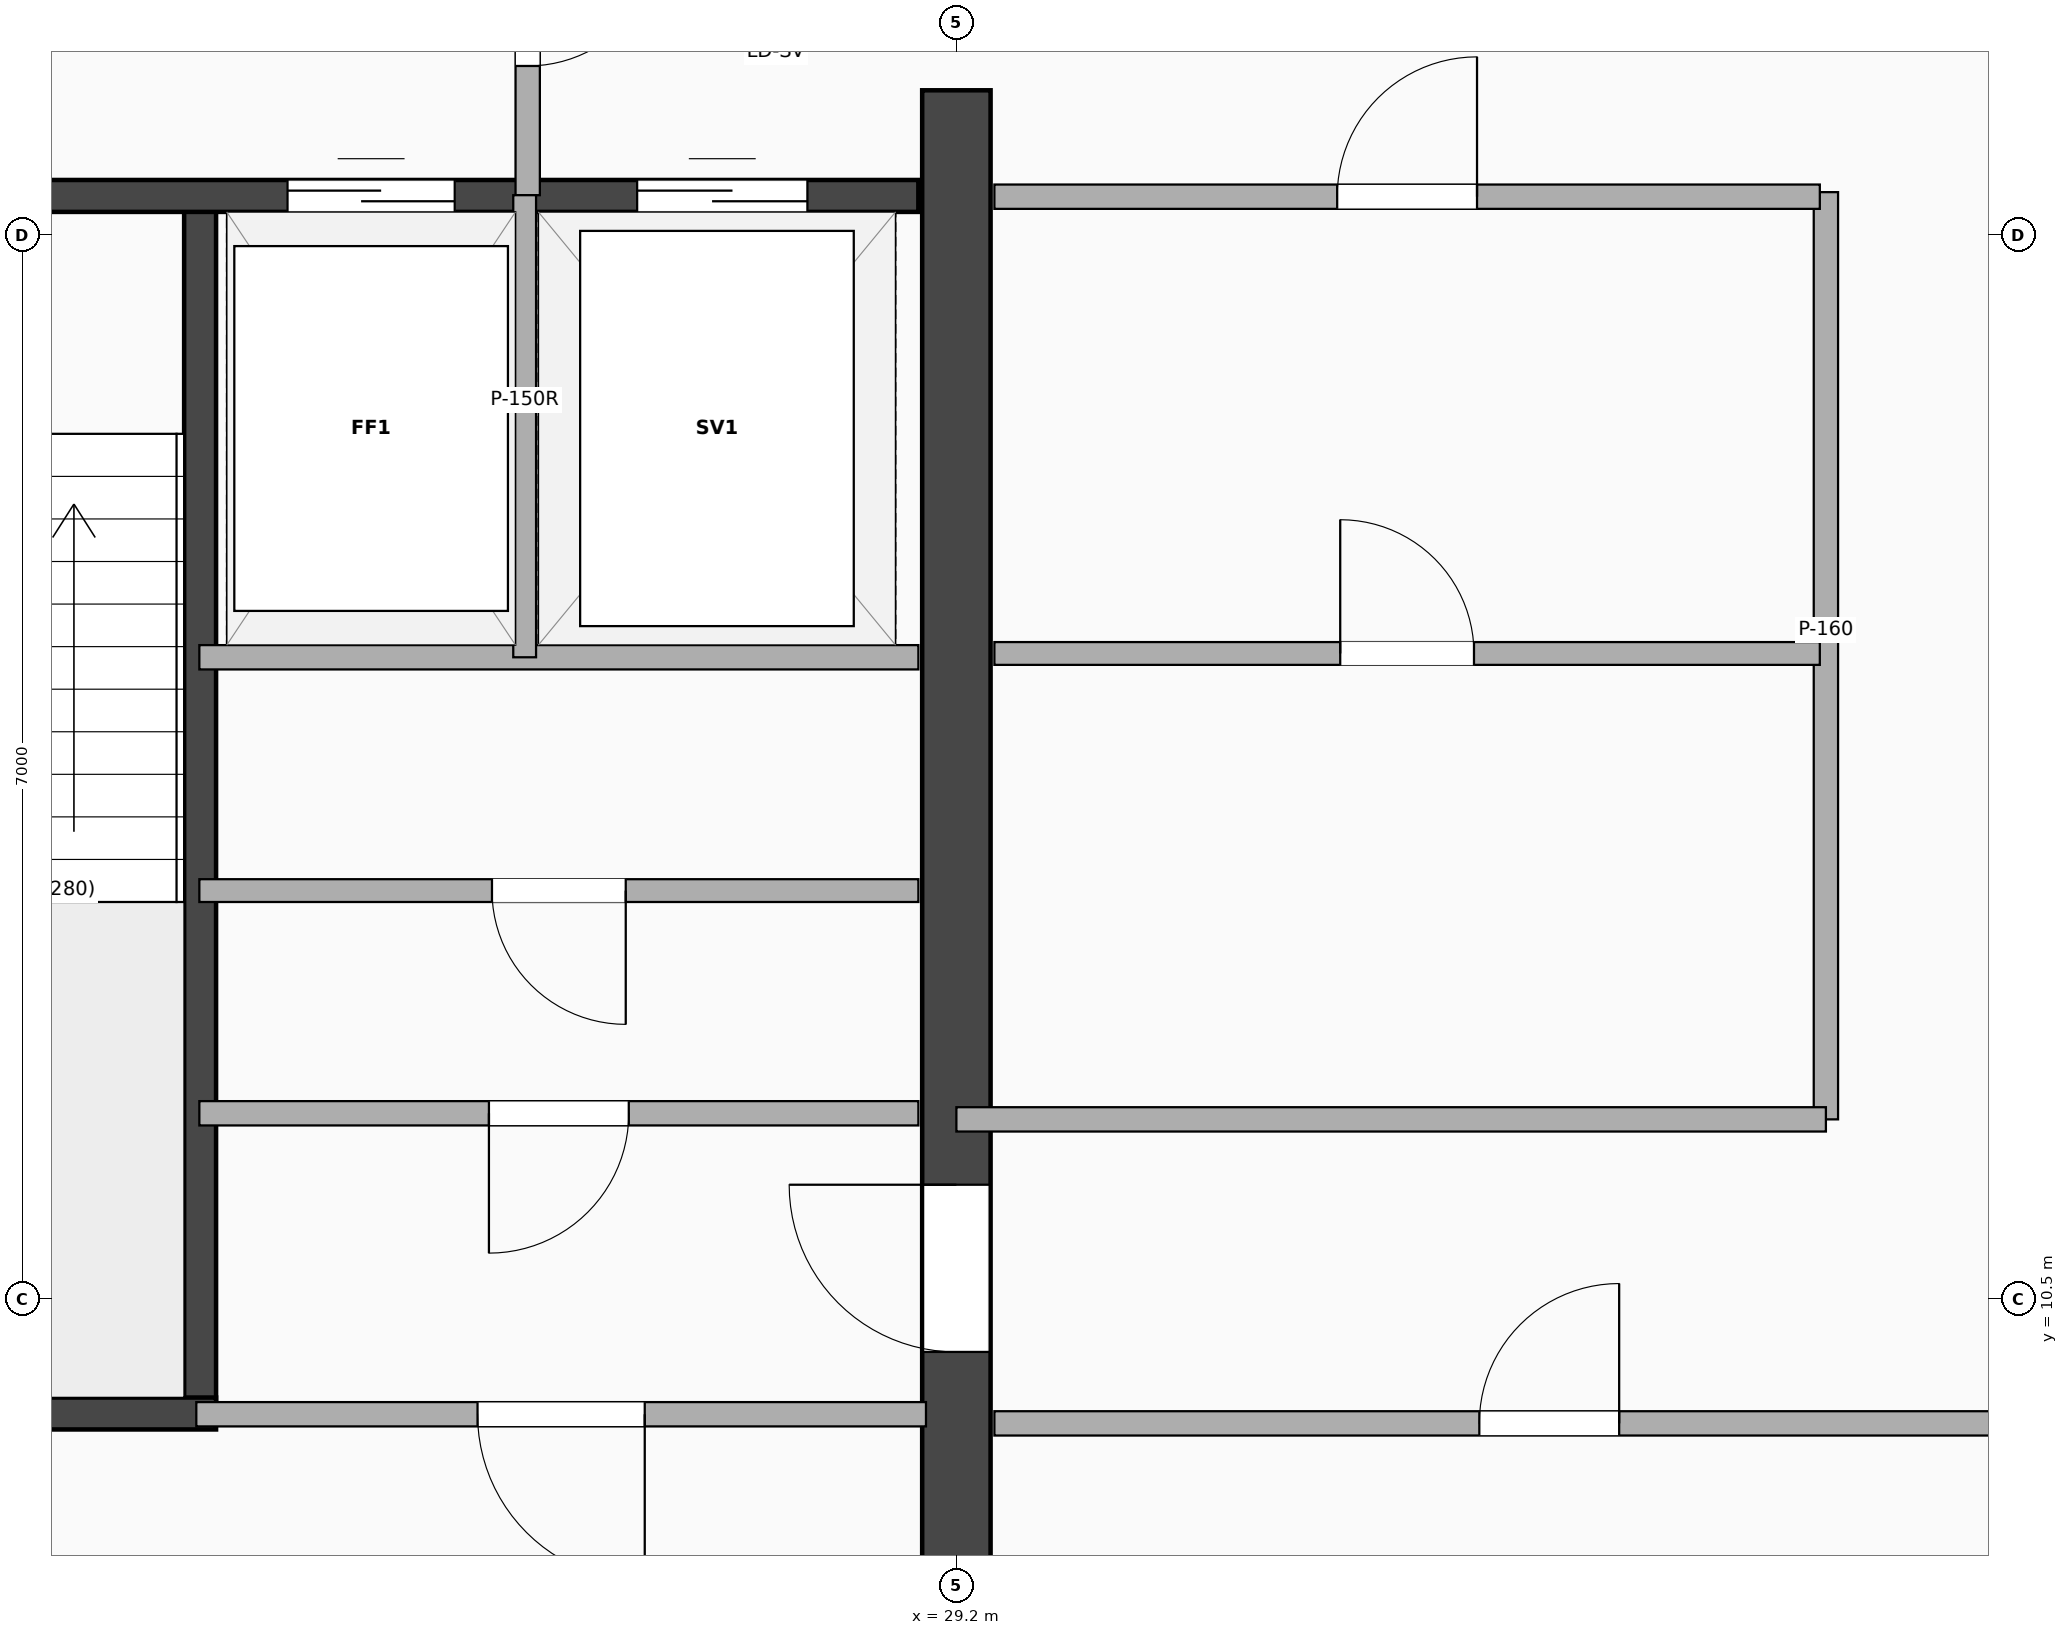
"""IFC4 building model, lengths in metres.
Left out: names, types, materials, properties, quantities, classifications, styles, units other than length and angle.
Written with IfcOpenShell. Run it as: python <this file> out.ifc"""

import sys

from ifc_helpers import new_model, si_unit, direction, frame, frame_2d, origin, place, context, subcontext, project, spatial, rectangle, extrude, element, fill, save


model = new_model("IFC4")
c1 = context("Model", 3, precision=1e-05, world=origin(), true_north=direction((0.0, 1.0)))
c2 = subcontext(c1, "Body", "Model", "MODEL_VIEW")
j1 = project(units=[si_unit("LENGTHUNIT", "METRE"), si_unit("PLANEANGLEUNIT", "RADIAN")], contexts=[c1])
p1 = place(None, origin())
s1 = spatial("IfcSite", under=j1, at=p1, CompositionType="ELEMENT")
p2 = place(p1, origin())
s2 = spatial("IfcBuilding", under=s1, at=p2, CompositionType="ELEMENT")
p3 = place(p2, frame((0.0, 0.0, 192.5)))
s3 = spatial("IfcBuildingStorey", under=s2, at=p3, CompositionType="ELEMENT", Elevation=192.5)
p4 = place(p3, frame((29.2, 3.5, 0.0), z_axis=(0.0, 0.0, 1.0), x_axis=(0.0, 1.0, 0.0)))
e1 = element("IfcWall", 1, at=p4, inside=s3, PredefinedType="SHEAR", context=c2, shape_type="SweptSolid", body=[
    extrude(rectangle(XDim=14.95, YDim=0.45, at=frame_2d((7.475, 0.0))), origin(), (0.0, 0.0, 1.0), 4.16),
])
p5 = place(p4, frame((7.75, 0.0, 0.0), z_axis=(0.0, 0.0, 1.0), x_axis=(-1.0, 0.0, 0.0)))
e2 = element("IfcOpeningElement", 2, at=p5, cuts=e1, PredefinedType="OPENING", context=c2, shape_type="SweptSolid", body=[
    extrude(rectangle(XDim=1.1, YDim=2.15, at=frame_2d((0.55, 1.075))), frame((0.0, 0.235, 0.0), z_axis=(0.0, -1.0, 0.0), x_axis=(1.0, 0.0, 0.0)), (0.0, 0.0, 1.0), 0.47),
])
p6 = place(p3, frame((24.225, 9.745, 0.0), z_axis=(0.0, 0.0, 1.0), x_axis=(0.0, 1.0, 0.0)))
e3 = element("IfcWall", 3, at=p6, inside=s3, PredefinedType="SHEAR", context=c2, shape_type="SweptSolid", body=[
    extrude(rectangle(XDim=8.01, YDim=0.21, at=frame_2d((4.005, 0.0))), origin(), (0.0, 0.0, 1.0), 4.16),
])
p7 = place(p3, frame((20.67, 9.745, 0.0), z_axis=(0.0, 0.0, 1.0), x_axis=(1.0, 0.0, 0.0)))
e4 = element("IfcWall", 4, at=p7, inside=s3, PredefinedType="SHEAR", context=c2, shape_type="SweptSolid", body=[
    extrude(rectangle(XDim=3.66, YDim=0.21, at=frame_2d((1.83, 0.0))), origin(), (0.0, 0.0, 1.0), 4.16),
])
p8 = place(p3, frame((20.65, 17.755, 0.0), z_axis=(0.0, 0.0, 1.0), x_axis=(1.0, 0.0, 0.0)))
e5 = element("IfcWall", 5, at=p8, inside=s3, PredefinedType="SHEAR", context=c2, shape_type="SweptSolid", body=[
    extrude(rectangle(XDim=8.3, YDim=0.21, at=frame_2d((4.15, 0.0))), origin(), (0.0, 0.0, 1.0), 4.16),
])
p9 = place(p8, frame((2.2, 0.0, 0.0), z_axis=(0.0, 0.0, 1.0), x_axis=(-1.0, 0.0, 0.0)))
e6 = element("IfcOpeningElement", 6, at=p9, cuts=e5, PredefinedType="OPENING", context=c2, shape_type="SweptSolid", body=[
    extrude(rectangle(XDim=1.05, YDim=2.15, at=frame_2d((0.525, 1.075))), frame((0.0, 0.115, 0.0), z_axis=(0.0, -1.0, 0.0), x_axis=(1.0, 0.0, 0.0)), (0.0, 0.0, 1.0), 0.23),
])
p10 = place(p8, frame((4.15, 0.0, 0.0)))
e7 = element("IfcOpeningElement", 7, at=p10, cuts=e5, PredefinedType="OPENING", context=c2, shape_type="SweptSolid", body=[
    extrude(rectangle(XDim=1.1, YDim=2.18, at=frame_2d((0.55, 1.09))), frame((0.0, 0.115, 0.0), z_axis=(0.0, -1.0, 0.0), x_axis=(1.0, 0.0, 0.0)), (0.0, 0.0, 1.0), 0.23),
])
p11 = place(p8, frame((6.45, 0.0, 0.0)))
e8 = element("IfcOpeningElement", 8, at=p11, cuts=e5, PredefinedType="OPENING", context=c2, shape_type="SweptSolid", body=[
    extrude(rectangle(XDim=1.12, YDim=2.2, at=frame_2d((0.56, 1.1))), frame((0.0, 0.115, 0.0), z_axis=(0.0, -1.0, 0.0), x_axis=(1.0, 0.0, 0.0)), (0.0, 0.0, 1.0), 0.23),
])
p12 = place(p3, frame((26.38, 17.76, 0.0), z_axis=(0.0, 0.0, 1.0), x_axis=(0.0, 1.0, 0.0)))
e9 = element("IfcWall", 9, at=p12, inside=s3, PredefinedType="PARTITIONING", context=c2, shape_type="SweptSolid", body=[
    extrude(rectangle(XDim=2.66, YDim=0.16, at=frame_2d((1.33, 0.0))), origin(), (0.0, 0.0, 1.0), 3.606),
])
p13 = place(p12, frame((0.85, 0.0, 0.0)))
e10 = element("IfcOpeningElement", 10, at=p13, cuts=e9, PredefinedType="OPENING", context=c2, shape_type="SweptSolid", body=[
    extrude(rectangle(XDim=0.88, YDim=2.08, at=frame_2d((0.44, 1.04))), frame((0.0, 0.09, 0.0), z_axis=(0.0, -1.0, 0.0), x_axis=(1.0, 0.0, 0.0)), (0.0, 0.0, 1.0), 0.18),
])
p14 = place(p3, frame((24.22, 14.72, 0.0), z_axis=(0.0, 0.0, 1.0), x_axis=(1.0, 0.0, 0.0)))
e11 = element("IfcWall", 11, at=p14, inside=s3, PredefinedType="PARTITIONING", context=c2, shape_type="SweptSolid", body=[
    extrude(rectangle(XDim=4.73, YDim=0.16, at=frame_2d((2.365, 0.0))), origin(), (0.0, 0.0, 1.0), 4.16),
])
p15 = place(p3, frame((26.36, 14.72, 0.0), z_axis=(0.0, 0.0, 1.0), x_axis=(0.0, 1.0, 0.0)))
e12 = element("IfcWall", 12, at=p15, inside=s3, PredefinedType="PARTITIONING", context=c2, shape_type="SweptSolid", body=[
    extrude(rectangle(XDim=3.04, YDim=0.15, at=frame_2d((1.52, 0.0))), origin(), (0.0, 0.0, 1.0), 4.16),
])
p16 = place(p3, frame((24.22, 11.72, 0.0), z_axis=(0.0, 0.0, 1.0), x_axis=(1.0, 0.0, 0.0)))
e13 = element("IfcWall", 13, at=p16, inside=s3, PredefinedType="PARTITIONING", context=c2, shape_type="SweptSolid", body=[
    extrude(rectangle(XDim=4.73, YDim=0.16, at=frame_2d((2.365, 0.0))), origin(), (0.0, 0.0, 1.0), 4.16),
])
p17 = place(p16, frame((1.905, 0.0, 0.0)))
e14 = element("IfcOpeningElement", 14, at=p17, cuts=e13, PredefinedType="OPENING", context=c2, shape_type="SweptSolid", body=[
    extrude(rectangle(XDim=0.92, YDim=2.08, at=frame_2d((0.46, 1.04))), frame((0.0, 0.09, 0.0), z_axis=(0.0, -1.0, 0.0), x_axis=(1.0, 0.0, 0.0)), (0.0, 0.0, 1.0), 0.18),
])
p18 = place(p3, frame((24.22, 13.185, 0.0), z_axis=(0.0, 0.0, 1.0), x_axis=(1.0, 0.0, 0.0)))
e15 = element("IfcWall", 15, at=p18, inside=s3, PredefinedType="PARTITIONING", context=c2, shape_type="SweptSolid", body=[
    extrude(rectangle(XDim=4.73, YDim=0.15, at=frame_2d((2.365, 0.0))), origin(), (0.0, 0.0, 1.0), 4.16),
])
p19 = place(p18, frame((1.925, 0.0, 0.0)))
e16 = element("IfcOpeningElement", 16, at=p19, cuts=e15, PredefinedType="OPENING", context=c2, shape_type="SweptSolid", body=[
    extrude(rectangle(XDim=0.88, YDim=2.08, at=frame_2d((0.44, 1.04))), frame((0.0, 0.085, 0.0), z_axis=(0.0, -1.0, 0.0), x_axis=(1.0, 0.0, 0.0)), (0.0, 0.0, 1.0), 0.17),
])
p20 = place(p3, frame((24.2, 9.74, 0.0), z_axis=(0.0, 0.0, 1.0), x_axis=(1.0, 0.0, 0.0)))
e17 = element("IfcWall", 17, at=p20, inside=s3, PredefinedType="PARTITIONING", context=c2, shape_type="SweptSolid", body=[
    extrude(rectangle(XDim=4.8, YDim=0.16, at=frame_2d((2.4, 0.0))), origin(), (0.0, 0.0, 1.0), 4.16),
])
p21 = place(p20, frame((1.85, 0.0, 0.0)))
e18 = element("IfcOpeningElement", 18, at=p21, cuts=e17, PredefinedType="OPENING", context=c2, shape_type="SweptSolid", body=[
    extrude(rectangle(XDim=1.1, YDim=2.15, at=frame_2d((0.55, 1.075))), frame((0.0, 0.09, 0.0), z_axis=(0.0, -1.0, 0.0), x_axis=(1.0, 0.0, 0.0)), (0.0, 0.0, 1.0), 0.18),
])
p22 = place(p3, frame((34.92, 11.68, 0.0), z_axis=(0.0, 0.0, 1.0), x_axis=(0.0, 1.0, 0.0)))
e19 = element("IfcWall", 19, at=p22, inside=s3, PredefinedType="PARTITIONING", context=c2, shape_type="SweptSolid", body=[
    extrude(rectangle(XDim=6.1, YDim=0.16, at=frame_2d((3.05, 0.0))), origin(), (0.0, 0.0, 1.0), 4.16),
])
p23 = place(p3, frame((29.45, 9.68, 0.0), z_axis=(0.0, 0.0, 1.0), x_axis=(1.0, 0.0, 0.0)))
e20 = element("IfcWall", 20, at=p23, inside=s3, PredefinedType="PARTITIONING", context=c2, shape_type="SweptSolid", body=[
    extrude(rectangle(XDim=7.3, YDim=0.16, at=frame_2d((3.65, 0.0))), origin(), (0.0, 0.0, 1.0), 4.16),
])
p24 = place(p23, frame((4.11, 0.0, 0.0), z_axis=(0.0, 0.0, 1.0), x_axis=(-1.0, 0.0, 0.0)))
e21 = element("IfcOpeningElement", 21, at=p24, cuts=e20, PredefinedType="OPENING", context=c2, shape_type="SweptSolid", body=[
    extrude(rectangle(XDim=0.92, YDim=2.08, at=frame_2d((0.46, 1.04))), frame((0.0, 0.09, 0.0), z_axis=(0.0, -1.0, 0.0), x_axis=(1.0, 0.0, 0.0)), (0.0, 0.0, 1.0), 0.18),
])
p25 = place(p3, frame((29.2, 11.68, 0.0), z_axis=(0.0, 0.0, 1.0), x_axis=(1.0, 0.0, 0.0)))
e22 = element("IfcWall", 22, at=p25, inside=s3, PredefinedType="PARTITIONING", context=c2, shape_type="SweptSolid", body=[
    extrude(rectangle(XDim=5.72, YDim=0.16, at=frame_2d((2.86, 0.0))), origin(), (0.0, 0.0, 1.0), 4.16),
])
p26 = place(p3, frame((29.45, 17.75, 0.0), z_axis=(0.0, 0.0, 1.0), x_axis=(1.0, 0.0, 0.0)))
e23 = element("IfcWall", 23, at=p26, inside=s3, PredefinedType="PARTITIONING", context=c2, shape_type="SweptSolid", body=[
    extrude(rectangle(XDim=5.43, YDim=0.16, at=frame_2d((2.715, 0.0))), origin(), (0.0, 0.0, 1.0), 4.16),
])
p27 = place(p26, frame((3.175, 0.0, 0.0), z_axis=(0.0, 0.0, 1.0), x_axis=(-1.0, 0.0, 0.0)))
e24 = element("IfcOpeningElement", 24, at=p27, cuts=e23, PredefinedType="OPENING", context=c2, shape_type="SweptSolid", body=[
    extrude(rectangle(XDim=0.92, YDim=2.08, at=frame_2d((0.46, 1.04))), frame((0.0, 0.09, 0.0), z_axis=(0.0, -1.0, 0.0), x_axis=(1.0, 0.0, 0.0)), (0.0, 0.0, 1.0), 0.18),
])
p28 = place(p3, frame((29.45, 14.745, 0.0), z_axis=(0.0, 0.0, 1.0), x_axis=(1.0, 0.0, 0.0)))
e25 = element("IfcWall", 25, at=p28, inside=s3, PredefinedType="PARTITIONING", context=c2, shape_type="SweptSolid", body=[
    extrude(rectangle(XDim=5.43, YDim=0.15, at=frame_2d((2.715, 0.0))), origin(), (0.0, 0.0, 1.0), 4.16),
])
p29 = place(p28, frame((3.155, 0.0, 0.0), z_axis=(0.0, 0.0, 1.0), x_axis=(-1.0, 0.0, 0.0)))
e26 = element("IfcOpeningElement", 26, at=p29, cuts=e25, PredefinedType="OPENING", context=c2, shape_type="SweptSolid", body=[
    extrude(rectangle(XDim=0.88, YDim=2.08, at=frame_2d((0.44, 1.04))), frame((0.0, 0.085, 0.0), z_axis=(0.0, -1.0, 0.0), x_axis=(1.0, 0.0, 0.0)), (0.0, 0.0, 1.0), 0.17),
])
p30 = place(p10, origin())
e27 = element("IfcDoor", 27, at=p30, inside=s3, OperationType="DOUBLE_DOOR_SLIDING", PredefinedType="DOOR", context=c2, shape_type="SweptSolid", body=[
    extrude(rectangle(XDim=1.1, YDim=2.18, at=frame_2d((0.55, 1.09))), frame((0.0, 0.025, 0.0), z_axis=(0.0, -1.0, 0.0), x_axis=(1.0, 0.0, 0.0)), (0.0, 0.0, 1.0), 0.05),
])
fill(e7, e27)
p31 = place(p11, origin())
e28 = element("IfcDoor", 28, at=p31, inside=s3, OperationType="DOUBLE_DOOR_SLIDING", PredefinedType="DOOR", context=c2, shape_type="SweptSolid", body=[
    extrude(rectangle(XDim=1.12, YDim=2.2, at=frame_2d((0.56, 1.1))), frame((0.0, 0.025, 0.0), z_axis=(0.0, -1.0, 0.0), x_axis=(1.0, 0.0, 0.0)), (0.0, 0.0, 1.0), 0.05),
])
fill(e8, e28)
p32 = place(p5, origin())
e29 = element("IfcDoor", 29, at=p32, inside=s3, OperationType="SINGLE_SWING_RIGHT", PredefinedType="DOOR", context=c2, shape_type="SweptSolid", body=[
    extrude(rectangle(XDim=1.1, YDim=2.15, at=frame_2d((0.55, 1.075))), frame((0.0, 0.025, 0.0), z_axis=(0.0, -1.0, 0.0), x_axis=(1.0, 0.0, 0.0)), (0.0, 0.0, 1.0), 0.05),
])
fill(e2, e29)
p33 = place(p13, origin())
e30 = element("IfcDoor", 30, at=p33, inside=s3, OperationType="SINGLE_SWING_RIGHT", PredefinedType="DOOR", context=c2, shape_type="SweptSolid", body=[
    extrude(rectangle(XDim=0.88, YDim=2.08, at=frame_2d((0.44, 1.04))), frame((0.0, 0.025, 0.0), z_axis=(0.0, -1.0, 0.0), x_axis=(1.0, 0.0, 0.0)), (0.0, 0.0, 1.0), 0.05),
])
fill(e10, e30)
p34 = place(p17, origin())
e31 = element("IfcDoor", 31, at=p34, inside=s3, OperationType="SINGLE_SWING_LEFT", PredefinedType="DOOR", context=c2, shape_type="SweptSolid", body=[
    extrude(rectangle(XDim=0.92, YDim=2.08, at=frame_2d((0.46, 1.04))), frame((0.0, 0.025, 0.0), z_axis=(0.0, -1.0, 0.0), x_axis=(1.0, 0.0, 0.0)), (0.0, 0.0, 1.0), 0.05),
])
fill(e14, e31)
p35 = place(p19, origin())
e32 = element("IfcDoor", 32, at=p35, inside=s3, OperationType="SINGLE_SWING_RIGHT", PredefinedType="DOOR", context=c2, shape_type="SweptSolid", body=[
    extrude(rectangle(XDim=0.88, YDim=2.08, at=frame_2d((0.44, 1.04))), frame((0.0, 0.025, 0.0), z_axis=(0.0, -1.0, 0.0), x_axis=(1.0, 0.0, 0.0)), (0.0, 0.0, 1.0), 0.05),
])
fill(e16, e32)
p36 = place(p21, origin())
e33 = element("IfcDoor", 33, at=p36, inside=s3, OperationType="SINGLE_SWING_RIGHT", PredefinedType="DOOR", context=c2, shape_type="SweptSolid", body=[
    extrude(rectangle(XDim=1.1, YDim=2.15, at=frame_2d((0.55, 1.075))), frame((0.0, 0.025, 0.0), z_axis=(0.0, -1.0, 0.0), x_axis=(1.0, 0.0, 0.0)), (0.0, 0.0, 1.0), 0.05),
])
fill(e18, e33)
p37 = place(p24, origin())
e34 = element("IfcDoor", 34, at=p37, inside=s3, OperationType="SINGLE_SWING_RIGHT", PredefinedType="DOOR", context=c2, shape_type="SweptSolid", body=[
    extrude(rectangle(XDim=0.92, YDim=2.08, at=frame_2d((0.46, 1.04))), frame((0.0, 0.025, 0.0), z_axis=(0.0, -1.0, 0.0), x_axis=(1.0, 0.0, 0.0)), (0.0, 0.0, 1.0), 0.05),
])
fill(e21, e34)
p38 = place(p27, origin())
e35 = element("IfcDoor", 35, at=p38, inside=s3, OperationType="SINGLE_SWING_RIGHT", PredefinedType="DOOR", context=c2, shape_type="SweptSolid", body=[
    extrude(rectangle(XDim=0.92, YDim=2.08, at=frame_2d((0.46, 1.04))), frame((0.0, 0.025, 0.0), z_axis=(0.0, -1.0, 0.0), x_axis=(1.0, 0.0, 0.0)), (0.0, 0.0, 1.0), 0.05),
])
fill(e24, e35)
p39 = place(p29, origin())
e36 = element("IfcDoor", 36, at=p39, inside=s3, OperationType="SINGLE_SWING_LEFT", PredefinedType="DOOR", context=c2, shape_type="SweptSolid", body=[
    extrude(rectangle(XDim=0.88, YDim=2.08, at=frame_2d((0.44, 1.04))), frame((0.0, 0.025, 0.0), z_axis=(0.0, -1.0, 0.0), x_axis=(1.0, 0.0, 0.0)), (0.0, 0.0, 1.0), 0.05),
])
fill(e26, e36)
save(model, sys.argv[1])
